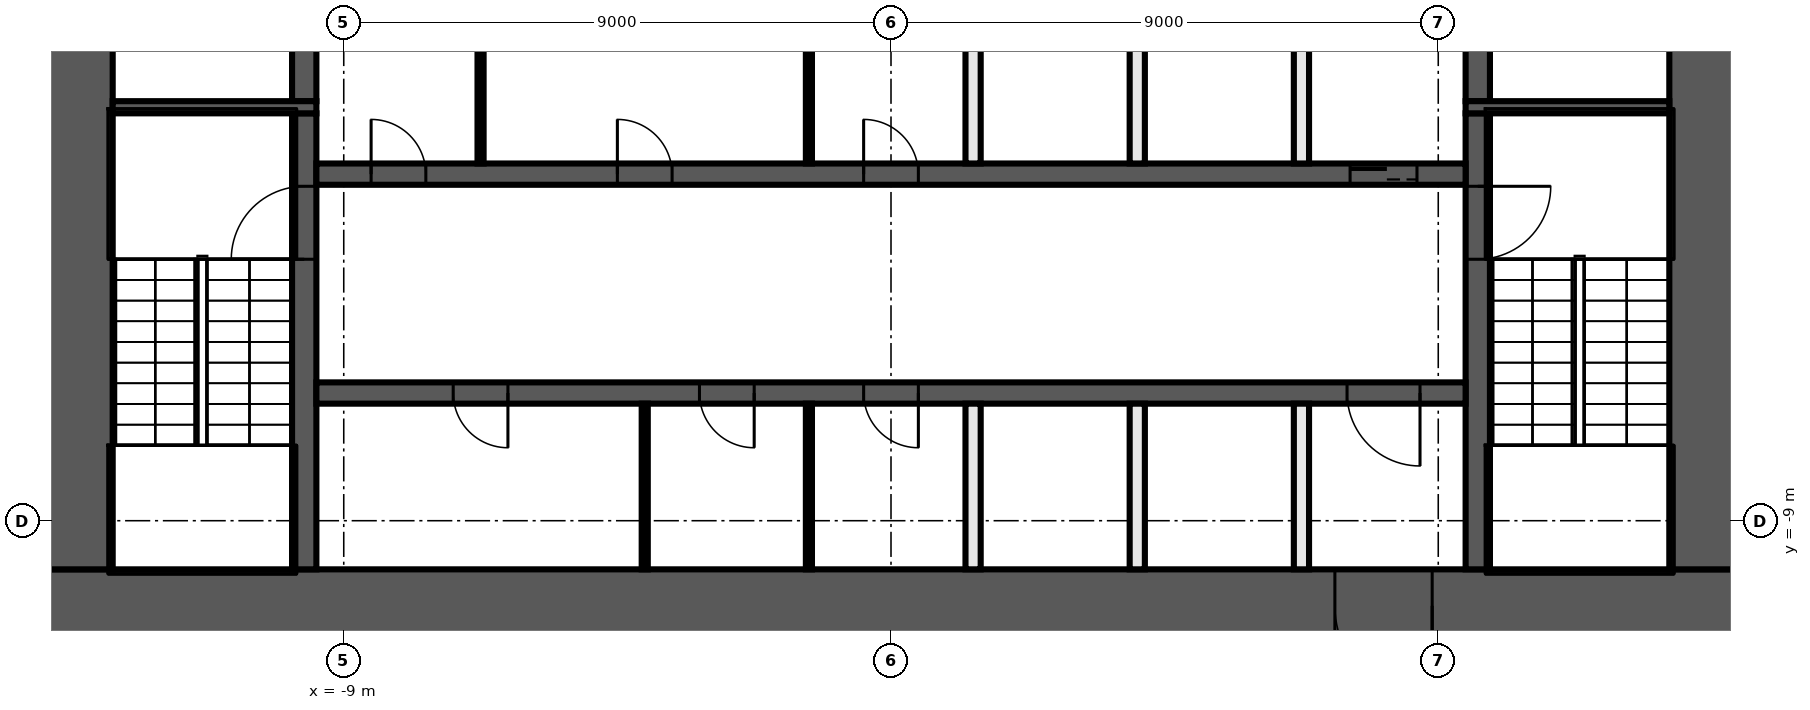
"""IFC4 building model, lengths in metres.
Left out: names, types, materials, properties, quantities, classifications, styles, units other than length and angle.
Written with IfcOpenShell. Run it as: python <this file> out.ifc"""

import sys

from ifc_helpers import new_model, si_unit, direction, frame, frame_2d, origin, place, context, subcontext, project, spatial, rectangle, extrude, element, fill, save


model = new_model("IFC4")
c1 = context("Model", 3, precision=1e-05, world=origin(), true_north=direction((0.0, 1.0)))
c2 = subcontext(c1, "Body", "Model", "MODEL_VIEW")
j1 = project(units=[si_unit("LENGTHUNIT", "METRE"), si_unit("PLANEANGLEUNIT", "RADIAN")], contexts=[c1])
p1 = place(None, origin())
s1 = spatial("IfcSite", under=j1, at=p1, CompositionType="ELEMENT")
p2 = place(p1, origin())
s2 = spatial("IfcBuilding", under=s1, at=p2, CompositionType="ELEMENT")
p3 = place(p2, frame((0.0, 0.0, 9.0)))
s3 = spatial("IfcBuildingStorey", under=s2, at=p3, CompositionType="ELEMENT", Elevation=9.0)
p4 = place(p3, frame((14.0, -10.4, 0.0), z_axis=(0.0, 0.0, 1.0), x_axis=(-1.0, 0.0, 0.0)))
e1 = element("IfcWall", 1, at=p4, inside=s3, PredefinedType="SHEAR", context=c2, shape_type="SweptSolid", body=[
    extrude(rectangle(XDim=28.0, YDim=1.2, at=frame_2d((14.0, 0.0))), origin(), (0.0, 0.0, 1.0), 9.55),
])
p5 = place(p4, frame((5.1, 0.0, 0.0)))
e2 = element("IfcOpeningElement", 2, at=p5, cuts=e1, PredefinedType="OPENING", context=c2, shape_type="SweptSolid", body=[
    extrude(rectangle(XDim=1.6, YDim=2.1, at=frame_2d((0.8, 1.05))), frame((0.0, 0.61, 0.0), z_axis=(0.0, -1.0, 0.0), x_axis=(1.0, 0.0, 0.0)), (0.0, 0.0, 1.0), 1.22),
])
for number, where, z_axis, x_axis in (
    (3, (13.4, 9.8, 0.0), (0.0, 0.0, 1.0), (0.0, -1.0, 0.0)),
    (4, (-13.4, -9.8, 0.0), (0.0, 0.0, 1.0), (0.0, 1.0, 0.0)),
):
    element("IfcWall", number, at=place(p3, frame(where, z_axis=z_axis, x_axis=x_axis)), inside=s3, PredefinedType="SHEAR", context=c2, shape_type="SweptSolid", body=[
        extrude(rectangle(XDim=19.6, YDim=1.2, at=frame_2d((9.8, 0.0))), origin(), (0.0, 0.0, 1.0), 9.55),
    ])
p6 = place(p3, frame((9.65, -2.3, 0.0), z_axis=(0.0, 0.0, 1.0), x_axis=(0.0, -1.0, 0.0)))
e5 = element("IfcWall", 5, at=p6, inside=s3, PredefinedType="SHEAR", context=c2, shape_type="SweptSolid", body=[
    extrude(rectangle(XDim=7.5, YDim=0.4, at=frame_2d((3.75, 0.0))), origin(), (0.0, 0.0, 1.0), 9.55),
])
p7 = place(p6, frame((1.2, 0.0, 0.0)))
e6 = element("IfcOpeningElement", 6, at=p7, cuts=e5, PredefinedType="OPENING", context=c2, shape_type="SweptSolid", body=[
    extrude(rectangle(XDim=1.2, YDim=2.1, at=frame_2d((0.6, 1.05))), frame((0.0, 0.21, 0.0), z_axis=(0.0, -1.0, 0.0), x_axis=(1.0, 0.0, 0.0)), (0.0, 0.0, 1.0), 0.42),
])
p8 = place(p3, frame((9.65, 2.1, 0.0), z_axis=(0.0, 0.0, 1.0), x_axis=(0.0, -1.0, 0.0)))
e7 = element("IfcWall", 7, at=p8, inside=s3, PredefinedType="SHEAR", context=c2, shape_type="SweptSolid", body=[
    extrude(rectangle(XDim=4.2, YDim=0.4, at=frame_2d((2.1, 0.0))), origin(), (0.0, 0.0, 1.0), 9.55),
])
p9 = place(p8, frame((0.15, 0.0, 0.0)))
e8 = element("IfcOpeningElement", 8, at=p9, cuts=e7, PredefinedType="OPENING", context=c2, shape_type="SweptSolid", body=[
    extrude(rectangle(XDim=0.9, YDim=2.1, at=frame_2d((0.45, 1.05))), frame((0.0, 0.21, 0.0), z_axis=(0.0, -1.0, 0.0), x_axis=(1.0, 0.0, 0.0)), (0.0, 0.0, 1.0), 0.42),
])
p10 = place(p3, frame((-9.65, -9.8, 0.0), z_axis=(0.0, 0.0, 1.0), x_axis=(0.0, 1.0, 0.0)))
e9 = element("IfcWall", 9, at=p10, inside=s3, PredefinedType="SHEAR", context=c2, shape_type="SweptSolid", body=[
    extrude(rectangle(XDim=7.5, YDim=0.4, at=frame_2d((3.75, 0.0))), origin(), (0.0, 0.0, 1.0), 9.55),
])
p11 = place(p10, frame((5.1, 0.0, 0.0)))
e10 = element("IfcOpeningElement", 10, at=p11, cuts=e9, PredefinedType="OPENING", context=c2, shape_type="SweptSolid", body=[
    extrude(rectangle(XDim=1.2, YDim=2.1, at=frame_2d((0.6, 1.05))), frame((0.0, 0.21, 0.0), z_axis=(0.0, -1.0, 0.0), x_axis=(1.0, 0.0, 0.0)), (0.0, 0.0, 1.0), 0.42),
])
p12 = place(p3, frame((-9.65, -2.1, 0.0), z_axis=(0.0, 0.0, 1.0), x_axis=(0.0, 1.0, 0.0)))
e11 = element("IfcWall", 11, at=p12, inside=s3, PredefinedType="SHEAR", context=c2, shape_type="SweptSolid", body=[
    extrude(rectangle(XDim=4.2, YDim=0.4, at=frame_2d((2.1, 0.0))), origin(), (0.0, 0.0, 1.0), 9.55),
])
for number, where, z_axis, x_axis in (
    (12, (9.45, -2.2, 0.0), (0.0, 0.0, 1.0), (1.0, 0.0, 0.0)),
    (13, (-9.45, -2.2, 0.0), (0.0, 0.0, 1.0), (-1.0, 0.0, 0.0)),
):
    element("IfcWall", number, at=place(p3, frame(where, z_axis=z_axis, x_axis=x_axis)), inside=s3, PredefinedType="SHEAR", context=c2, shape_type="SweptSolid", body=[
        extrude(rectangle(XDim=3.35, YDim=0.2, at=frame_2d((1.675, 0.0))), origin(), (0.0, 0.0, 1.0), 9.55),
    ])
p13 = place(p3, frame((-9.45, -3.3, 0.0), z_axis=(0.0, 0.0, 1.0), x_axis=(1.0, 0.0, 0.0)))
e14 = element("IfcWall", 14, at=p13, inside=s3, PredefinedType="SHEAR", context=c2, shape_type="SweptSolid", body=[
    extrude(rectangle(XDim=18.9, YDim=0.35, at=frame_2d((9.45, 0.0))), origin(), (0.0, 0.0, 1.0), 9.55),
])
p14 = place(p13, frame((17.0, 0.0, 0.0)))
e15 = element("IfcOpeningElement", 15, at=p14, cuts=e14, PredefinedType="OPENING", context=c2, shape_type="SweptSolid", body=[
    extrude(rectangle(XDim=1.1, YDim=2.1, at=frame_2d((0.55, 1.05))), frame((0.0, 0.185, 0.0), z_axis=(0.0, -1.0, 0.0), x_axis=(1.0, 0.0, 0.0)), (0.0, 0.0, 1.0), 0.37),
])
p15 = place(p13, frame((0.9, 0.0, 0.0)))
e16 = element("IfcOpeningElement", 16, at=p15, cuts=e14, PredefinedType="OPENING", context=c2, shape_type="SweptSolid", body=[
    extrude(rectangle(XDim=0.9, YDim=2.1, at=frame_2d((0.45, 1.05))), frame((0.0, 0.185, 0.0), z_axis=(0.0, -1.0, 0.0), x_axis=(1.0, 0.0, 0.0)), (0.0, 0.0, 1.0), 0.37),
])
p16 = place(p13, frame((4.95, 0.0, 0.0)))
e17 = element("IfcOpeningElement", 17, at=p16, cuts=e14, PredefinedType="OPENING", context=c2, shape_type="SweptSolid", body=[
    extrude(rectangle(XDim=0.9, YDim=2.1, at=frame_2d((0.45, 1.05))), frame((0.0, 0.185, 0.0), z_axis=(0.0, -1.0, 0.0), x_axis=(1.0, 0.0, 0.0)), (0.0, 0.0, 1.0), 0.37),
])
p17 = place(p13, frame((9.0, 0.0, 0.0)))
e18 = element("IfcOpeningElement", 18, at=p17, cuts=e14, PredefinedType="OPENING", context=c2, shape_type="SweptSolid", body=[
    extrude(rectangle(XDim=0.9, YDim=2.1, at=frame_2d((0.45, 1.05))), frame((0.0, 0.185, 0.0), z_axis=(0.0, -1.0, 0.0), x_axis=(1.0, 0.0, 0.0)), (0.0, 0.0, 1.0), 0.37),
])
p18 = place(p3, frame((9.45, -6.9, 0.0), z_axis=(0.0, 0.0, 1.0), x_axis=(-1.0, 0.0, 0.0)))
e19 = element("IfcWall", 19, at=p18, inside=s3, PredefinedType="SHEAR", context=c2, shape_type="SweptSolid", body=[
    extrude(rectangle(XDim=18.9, YDim=0.35, at=frame_2d((9.45, 0.0))), origin(), (0.0, 0.0, 1.0), 9.55),
])
p19 = place(p18, frame((0.75, 0.0, 0.0)))
e20 = element("IfcOpeningElement", 20, at=p19, cuts=e19, PredefinedType="OPENING", context=c2, shape_type="SweptSolid", body=[
    extrude(rectangle(XDim=1.2, YDim=2.1, at=frame_2d((0.6, 1.05))), frame((0.0, 0.185, 0.0), z_axis=(0.0, -1.0, 0.0), x_axis=(1.0, 0.0, 0.0)), (0.0, 0.0, 1.0), 0.37),
])
p20 = place(p18, frame((15.75, 0.0, 0.0)))
e21 = element("IfcOpeningElement", 21, at=p20, cuts=e19, PredefinedType="OPENING", context=c2, shape_type="SweptSolid", body=[
    extrude(rectangle(XDim=0.9, YDim=2.1, at=frame_2d((0.45, 1.05))), frame((0.0, 0.185, 0.0), z_axis=(0.0, -1.0, 0.0), x_axis=(1.0, 0.0, 0.0)), (0.0, 0.0, 1.0), 0.37),
])
p21 = place(p18, frame((11.7, 0.0, 0.0)))
e22 = element("IfcOpeningElement", 22, at=p21, cuts=e19, PredefinedType="OPENING", context=c2, shape_type="SweptSolid", body=[
    extrude(rectangle(XDim=0.9, YDim=2.1, at=frame_2d((0.45, 1.05))), frame((0.0, 0.185, 0.0), z_axis=(0.0, -1.0, 0.0), x_axis=(1.0, 0.0, 0.0)), (0.0, 0.0, 1.0), 0.37),
])
p22 = place(p18, frame((9.0, 0.0, 0.0)))
e23 = element("IfcOpeningElement", 23, at=p22, cuts=e19, PredefinedType="OPENING", context=c2, shape_type="SweptSolid", body=[
    extrude(rectangle(XDim=0.9, YDim=2.1, at=frame_2d((0.45, 1.05))), frame((0.0, 0.185, 0.0), z_axis=(0.0, -1.0, 0.0), x_axis=(1.0, 0.0, 0.0)), (0.0, 0.0, 1.0), 0.37),
])
for number, where, z_axis, x_axis in (
    (24, (6.75, -9.8, 0.0), (0.0, 0.0, 1.0), (0.0, 1.0, 0.0)),
    (25, (6.75, -3.125, 0.0), (0.0, 0.0, 1.0), (0.0, 1.0, 0.0)),
    (26, (4.05, -9.8, 0.0), (0.0, 0.0, 1.0), (0.0, 1.0, 0.0)),
    (27, (4.05, -3.125, 0.0), (0.0, 0.0, 1.0), (0.0, 1.0, 0.0)),
    (28, (1.35, -9.8, 0.0), (0.0, 0.0, 1.0), (0.0, 1.0, 0.0)),
    (29, (1.35, -3.125, 0.0), (0.0, 0.0, 1.0), (0.0, 1.0, 0.0)),
):
    element("IfcWall", number, at=place(p3, frame(where, z_axis=z_axis, x_axis=x_axis)), inside=s3, PredefinedType="SOLIDWALL", context=c2, shape_type="SweptSolid", body=[
        extrude(rectangle(XDim=2.725, YDim=0.25, at=frame_2d((1.363, 0.0))), origin(), (0.0, 0.0, 1.0), 9.55),
    ])
for number, where, z_axis, x_axis in (
    (30, (-1.35, -9.8, 0.0), (0.0, 0.0, 1.0), (0.0, 1.0, 0.0)),
    (31, (-1.35, -3.125, 0.0), (0.0, 0.0, 1.0), (0.0, 1.0, 0.0)),
    (32, (-4.05, -9.8, 0.0), (0.0, 0.0, 1.0), (0.0, 1.0, 0.0)),
    (33, (-6.75, -3.125, 0.0), (0.0, 0.0, 1.0), (0.0, 1.0, 0.0)),
):
    element("IfcWall", number, at=place(p3, frame(where, z_axis=z_axis, x_axis=x_axis)), inside=s3, PredefinedType="PARTITIONING", context=c2, shape_type="SweptSolid", body=[
        extrude(rectangle(XDim=2.725, YDim=0.1, at=frame_2d((1.363, 0.0))), origin(), (0.0, 0.0, 1.0), 9.55),
    ])
p23 = place(p14, origin())
e34 = element("IfcDoor", 34, at=p23, inside=s3, OperationType="DOUBLE_DOOR_SLIDING", PredefinedType="DOOR", context=c2, shape_type="SweptSolid", body=[
    extrude(rectangle(XDim=1.1, YDim=2.1, at=frame_2d((0.55, 1.05))), frame((0.0, 0.025, 0.0), z_axis=(0.0, -1.0, 0.0), x_axis=(1.0, 0.0, 0.0)), (0.0, 0.0, 1.0), 0.05),
])
fill(e15, e34)
p24 = place(p5, origin())
e35 = element("IfcDoor", 35, at=p24, inside=s3, OperationType="DOUBLE_DOOR_SINGLE_SWING", PredefinedType="DOOR", context=c2, shape_type="SweptSolid", body=[
    extrude(rectangle(XDim=1.6, YDim=2.1, at=frame_2d((0.8, 1.05))), frame((0.0, 0.025, 0.0), z_axis=(0.0, -1.0, 0.0), x_axis=(1.0, 0.0, 0.0)), (0.0, 0.0, 1.0), 0.05),
])
fill(e2, e35)
p25 = place(p19, origin())
e36 = element("IfcDoor", 36, at=p25, inside=s3, OperationType="SINGLE_SWING_LEFT", PredefinedType="DOOR", context=c2, shape_type="SweptSolid", body=[
    extrude(rectangle(XDim=1.2, YDim=2.1, at=frame_2d((0.6, 1.05))), frame((0.0, 0.025, 0.0), z_axis=(0.0, -1.0, 0.0), x_axis=(1.0, 0.0, 0.0)), (0.0, 0.0, 1.0), 0.05),
])
fill(e20, e36)
p26 = place(p15, origin())
e37 = element("IfcDoor", 37, at=p26, inside=s3, OperationType="SINGLE_SWING_RIGHT", PredefinedType="DOOR", context=c2, shape_type="SweptSolid", body=[
    extrude(rectangle(XDim=0.9, YDim=2.1, at=frame_2d((0.45, 1.05))), frame((0.0, 0.025, 0.0), z_axis=(0.0, -1.0, 0.0), x_axis=(1.0, 0.0, 0.0)), (0.0, 0.0, 1.0), 0.05),
])
fill(e16, e37)
p27 = place(p16, origin())
e38 = element("IfcDoor", 38, at=p27, inside=s3, OperationType="SINGLE_SWING_LEFT", PredefinedType="DOOR", context=c2, shape_type="SweptSolid", body=[
    extrude(rectangle(XDim=0.9, YDim=2.1, at=frame_2d((0.45, 1.05))), frame((0.0, 0.025, 0.0), z_axis=(0.0, -1.0, 0.0), x_axis=(1.0, 0.0, 0.0)), (0.0, 0.0, 1.0), 0.05),
])
fill(e17, e38)
p28 = place(p17, origin())
e39 = element("IfcDoor", 39, at=p28, inside=s3, OperationType="SINGLE_SWING_RIGHT", PredefinedType="DOOR", context=c2, shape_type="SweptSolid", body=[
    extrude(rectangle(XDim=0.9, YDim=2.1, at=frame_2d((0.45, 1.05))), frame((0.0, 0.025, 0.0), z_axis=(0.0, -1.0, 0.0), x_axis=(1.0, 0.0, 0.0)), (0.0, 0.0, 1.0), 0.05),
])
fill(e18, e39)
p29 = place(p20, origin())
e40 = element("IfcDoor", 40, at=p29, inside=s3, OperationType="SINGLE_SWING_LEFT", PredefinedType="DOOR", context=c2, shape_type="SweptSolid", body=[
    extrude(rectangle(XDim=0.9, YDim=2.1, at=frame_2d((0.45, 1.05))), frame((0.0, 0.025, 0.0), z_axis=(0.0, -1.0, 0.0), x_axis=(1.0, 0.0, 0.0)), (0.0, 0.0, 1.0), 0.05),
])
fill(e21, e40)
p30 = place(p21, origin())
e41 = element("IfcDoor", 41, at=p30, inside=s3, OperationType="SINGLE_SWING_RIGHT", PredefinedType="DOOR", context=c2, shape_type="SweptSolid", body=[
    extrude(rectangle(XDim=0.9, YDim=2.1, at=frame_2d((0.45, 1.05))), frame((0.0, 0.025, 0.0), z_axis=(0.0, -1.0, 0.0), x_axis=(1.0, 0.0, 0.0)), (0.0, 0.0, 1.0), 0.05),
])
fill(e22, e41)
p31 = place(p22, origin())
e42 = element("IfcDoor", 42, at=p31, inside=s3, OperationType="SINGLE_SWING_LEFT", PredefinedType="DOOR", context=c2, shape_type="SweptSolid", body=[
    extrude(rectangle(XDim=0.9, YDim=2.1, at=frame_2d((0.45, 1.05))), frame((0.0, 0.025, 0.0), z_axis=(0.0, -1.0, 0.0), x_axis=(1.0, 0.0, 0.0)), (0.0, 0.0, 1.0), 0.05),
])
fill(e23, e42)
p32 = place(p7, origin())
e43 = element("IfcDoor", 43, at=p32, inside=s3, OperationType="SINGLE_SWING_RIGHT", PredefinedType="DOOR", context=c2, shape_type="SweptSolid", body=[
    extrude(rectangle(XDim=1.2, YDim=2.1, at=frame_2d((0.6, 1.05))), frame((0.0, 0.025, 0.0), z_axis=(0.0, -1.0, 0.0), x_axis=(1.0, 0.0, 0.0)), (0.0, 0.0, 1.0), 0.05),
])
fill(e6, e43)
p33 = place(p11, origin())
e44 = element("IfcDoor", 44, at=p33, inside=s3, OperationType="SINGLE_SWING_LEFT", PredefinedType="DOOR", context=c2, shape_type="SweptSolid", body=[
    extrude(rectangle(XDim=1.2, YDim=2.1, at=frame_2d((0.6, 1.05))), frame((0.0, 0.025, 0.0), z_axis=(0.0, -1.0, 0.0), x_axis=(1.0, 0.0, 0.0)), (0.0, 0.0, 1.0), 0.05),
])
fill(e10, e44)
save(model, sys.argv[1])
